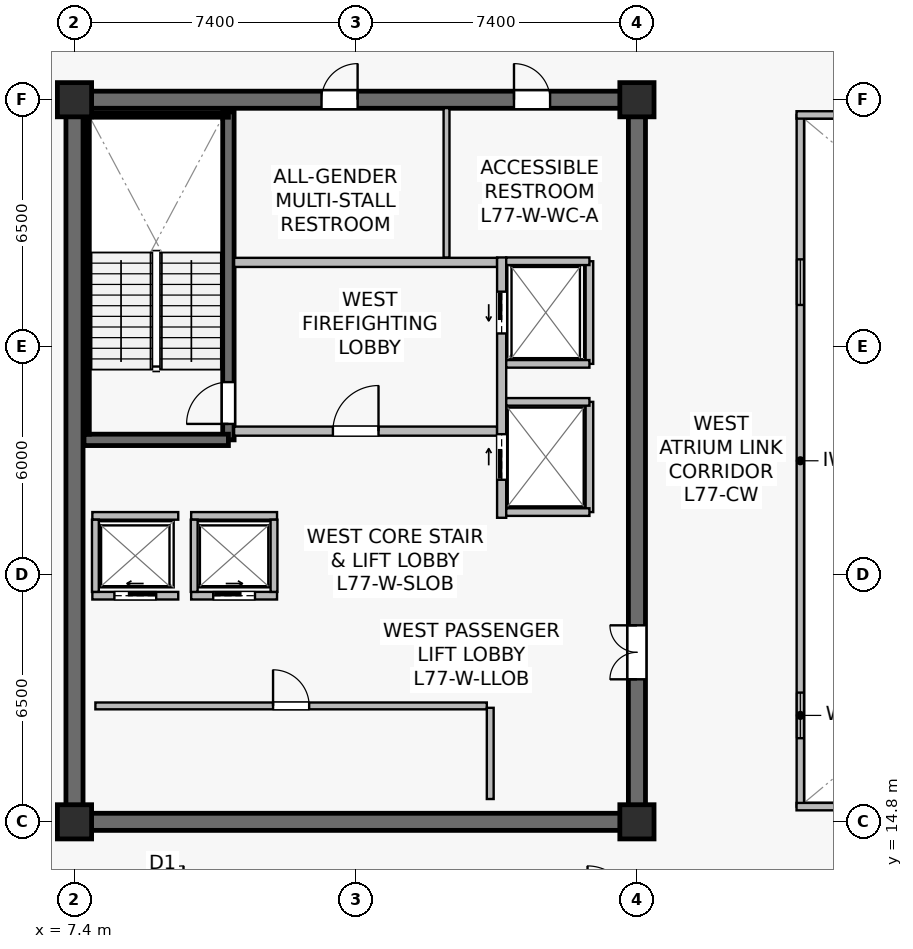
"""IFC4 building model, lengths in metres.
Left out: names, types, materials, properties, quantities, classifications, styles, units other than length and angle.
Written with IfcOpenShell. Run it as: python <this file> out.ifc"""

import sys

from ifc_helpers import new_model, si_unit, direction, frame, frame_2d, origin, origin_2d, place, context, subcontext, project, spatial, rectangle, extrude, source, transform, mapped, element, fill, save


model = new_model("IFC4")
c1 = context("Model", 3, precision=1e-05, world=origin(), true_north=direction((0.0, 1.0)))
c2 = subcontext(c1, "Body", "Model", "MODEL_VIEW")
j1 = project(units=[si_unit("LENGTHUNIT", "METRE"), si_unit("PLANEANGLEUNIT", "RADIAN")], contexts=[c1])
p1 = place(None, origin())
s1 = spatial("IfcSite", under=j1, at=p1, CompositionType="ELEMENT")
p2 = place(p1, origin())
s2 = spatial("IfcBuilding", under=s1, at=p2, CompositionType="ELEMENT")
p3 = place(p2, frame((0.0, 0.0, 322.8)))
s3 = spatial("IfcBuildingStorey", under=s2, at=p3, CompositionType="ELEMENT", Elevation=322.8)
p4 = place(p3, frame((7.175, 14.8, 0.0), z_axis=(0.0, 0.0, 1.0), x_axis=(1.0, 0.0, 0.0)))
e1 = element("IfcWall", 1, at=p4, inside=s3, PredefinedType="SHEAR", context=c2, shape_type="SweptSolid", body=[
    extrude(rectangle(XDim=15.25, YDim=0.45, at=frame_2d((7.625, 0.0))), origin(), (0.0, 0.0, 1.0), 3.92),
])
p5 = place(p3, frame((7.175, 33.8, 0.0), z_axis=(0.0, 0.0, 1.0), x_axis=(1.0, 0.0, 0.0)))
e2 = element("IfcWall", 2, at=p5, inside=s3, PredefinedType="SHEAR", context=c2, shape_type="SweptSolid", body=[
    extrude(rectangle(XDim=15.25, YDim=0.45, at=frame_2d((7.625, 0.0))), origin(), (0.0, 0.0, 1.0), 3.92),
])
p6 = place(p5, frame((6.725, 0.0, 0.0)))
e3 = element("IfcOpeningElement", 3, at=p6, cuts=e2, PredefinedType="OPENING", context=c2, shape_type="SweptSolid", body=[
    extrude(rectangle(XDim=0.95, YDim=2.15, at=frame_2d((0.475, 1.075))), frame((0.0, 0.235, 0.0), z_axis=(0.0, -1.0, 0.0), x_axis=(1.0, 0.0, 0.0)), (0.0, 0.0, 1.0), 0.47),
])
p7 = place(p5, frame((11.79, 0.0, 0.0)))
e4 = element("IfcOpeningElement", 4, at=p7, cuts=e2, PredefinedType="OPENING", context=c2, shape_type="SweptSolid", body=[
    extrude(rectangle(XDim=0.95, YDim=2.15, at=frame_2d((0.475, 1.075))), frame((0.0, 0.235, 0.0), z_axis=(0.0, -1.0, 0.0), x_axis=(1.0, 0.0, 0.0)), (0.0, 0.0, 1.0), 0.47),
])
p8 = place(p3, frame((7.4, 15.025, 0.0), z_axis=(0.0, 0.0, 1.0), x_axis=(0.0, 1.0, 0.0)))
e5 = element("IfcWall", 5, at=p8, inside=s3, PredefinedType="SHEAR", context=c2, shape_type="SweptSolid", body=[
    extrude(rectangle(XDim=18.55, YDim=0.45, at=frame_2d((9.275, 0.0))), origin(), (0.0, 0.0, 1.0), 3.92),
])
p9 = place(p3, frame((22.2, 15.025, 0.0), z_axis=(0.0, 0.0, 1.0), x_axis=(0.0, 1.0, 0.0)))
e6 = element("IfcWall", 6, at=p9, inside=s3, PredefinedType="SHEAR", context=c2, shape_type="SweptSolid", body=[
    extrude(rectangle(XDim=18.55, YDim=0.45, at=frame_2d((9.275, 0.0))), origin(), (0.0, 0.0, 1.0), 3.92),
])
p10 = place(p9, frame((3.525, 0.0, 0.0)))
e7 = element("IfcOpeningElement", 7, at=p10, cuts=e6, PredefinedType="OPENING", context=c2, shape_type="SweptSolid", body=[
    extrude(rectangle(XDim=1.42, YDim=2.2, at=frame_2d((0.71, 1.1))), frame((0.0, 0.235, 0.0), z_axis=(0.0, -1.0, 0.0), x_axis=(1.0, 0.0, 0.0)), (0.0, 0.0, 1.0), 0.47),
])
p11 = place(p3, frame((11.45, 24.85, 0.0), z_axis=(0.0, 0.0, 1.0), x_axis=(0.0, 1.0, 0.0)))
e8 = element("IfcWall", 8, at=p11, inside=s3, PredefinedType="SHEAR", context=c2, shape_type="SweptSolid", body=[
    extrude(rectangle(XDim=8.63, YDim=0.3, at=frame_2d((4.315, 0.0))), origin(), (0.0, 0.0, 1.0), 3.92),
])
p12 = place(p11, frame((0.42, 0.0, 0.0)))
e9 = element("IfcOpeningElement", 9, at=p12, cuts=e8, PredefinedType="OPENING", context=c2, shape_type="SweptSolid", body=[
    extrude(rectangle(XDim=1.1, YDim=2.15, at=frame_2d((0.55, 1.075))), frame((0.0, 0.16, 0.0), z_axis=(0.0, -1.0, 0.0), x_axis=(1.0, 0.0, 0.0)), (0.0, 0.0, 1.0), 0.32),
])
p13 = place(p3, frame((7.65, 24.85, 0.0), z_axis=(0.0, 0.0, 1.0), x_axis=(1.0, 0.0, 0.0)))
e10 = element("IfcWall", 10, at=p13, inside=s3, PredefinedType="SHEAR", context=c2, shape_type="SweptSolid", body=[
    extrude(rectangle(XDim=3.8, YDim=0.3, at=frame_2d((1.9, 0.0))), origin(), (0.0, 0.0, 1.0), 3.92),
])
p14 = place(p3, frame((7.73, 33.4, 0.0), z_axis=(0.0, 0.0, 1.0), x_axis=(1.0, 0.0, 0.0)))
e11 = element("IfcWall", 11, at=p14, inside=s3, PredefinedType="SOLIDWALL", context=c2, shape_type="SweptSolid", body=[
    extrude(rectangle(XDim=3.72, YDim=0.12, at=frame_2d((1.86, 0.0))), origin(), (0.0, 0.0, 1.0), 3.92),
])
p15 = place(p3, frame((7.73, 25.0, 0.0), z_axis=(0.0, 0.0, 1.0), x_axis=(0.0, 1.0, 0.0)))
e12 = element("IfcWall", 12, at=p15, inside=s3, PredefinedType="SOLIDWALL", context=c2, shape_type="SweptSolid", body=[
    extrude(rectangle(XDim=8.32, YDim=0.12, at=frame_2d((4.16, 0.0))), origin(), (0.0, 0.0, 1.0), 3.92),
])
m1 = source(origin(), c2, "Body", "SweptSolid", [
    extrude(rectangle(XDim=0.9, YDim=0.9, at=origin_2d()), origin(), (0.0, 0.0, 1.0), 4.2),
])
for number, where, z_axis, x_axis in (
    (13, (7.4, 14.8, 0.0), (0.0, 0.0, 1.0), (1.0, 0.0, 0.0)),
    (14, (22.2, 14.8, 0.0), (0.0, 0.0, 1.0), (1.0, 0.0, 0.0)),
    (15, (7.4, 33.8, 0.0), (0.0, 0.0, 1.0), (1.0, 0.0, 0.0)),
    (16, (22.2, 33.8, 0.0), (0.0, 0.0, 1.0), (1.0, 0.0, 0.0)),
):
    element("IfcColumn", number, at=place(p3, frame(where, z_axis=z_axis, x_axis=x_axis)), inside=s3, PredefinedType="COLUMN", context=c2, shape_type="MappedRepresentation", body=[
        mapped(m1, transform((0.0, 0.0, 0.0), scale=1.0)),
    ])
p16 = place(p3, frame((11.6, 25.08, 0.0), z_axis=(0.0, 0.0, 1.0), x_axis=(1.0, 0.0, 0.0)))
e17 = element("IfcWall", 17, at=p16, inside=s3, PredefinedType="SOLIDWALL", context=c2, shape_type="SweptSolid", body=[
    extrude(rectangle(XDim=6.92, YDim=0.24, at=frame_2d((3.46, 0.0))), origin(), (0.0, 0.0, 1.0), 3.317),
])
p17 = place(p16, frame((2.6, 0.0, 0.0)))
e18 = element("IfcOpeningElement", 18, at=p17, cuts=e17, PredefinedType="OPENING", context=c2, shape_type="SweptSolid", body=[
    extrude(rectangle(XDim=1.2, YDim=2.16, at=frame_2d((0.6, 1.08))), frame((0.0, 0.13, 0.0), z_axis=(0.0, -1.0, 0.0), x_axis=(1.0, 0.0, 0.0)), (0.0, 0.0, 1.0), 0.26),
])
p18 = place(p3, frame((11.6, 29.52, 0.0), z_axis=(0.0, 0.0, 1.0), x_axis=(1.0, 0.0, 0.0)))
e19 = element("IfcWall", 19, at=p18, inside=s3, PredefinedType="SOLIDWALL", context=c2, shape_type="SweptSolid", body=[
    extrude(rectangle(XDim=6.92, YDim=0.24, at=frame_2d((3.46, 0.0))), origin(), (0.0, 0.0, 1.0), 3.317),
])
p19 = place(p3, frame((18.64, 22.8, 0.0), z_axis=(0.0, 0.0, 1.0), x_axis=(0.0, 1.0, 0.0)))
e20 = element("IfcWall", 20, at=p19, inside=s3, PredefinedType="SOLIDWALL", context=c2, shape_type="SweptSolid", body=[
    extrude(rectangle(XDim=6.85, YDim=0.24, at=frame_2d((3.425, 0.0))), origin(), (0.0, 0.0, 1.0), 3.055),
])
p20 = place(p19, frame((4.85, 0.0, 0.0)))
e21 = element("IfcOpeningElement", 21, at=p20, cuts=e20, PredefinedType="OPENING", context=c2, shape_type="SweptSolid", body=[
    extrude(rectangle(XDim=1.1, YDim=2.22, at=frame_2d((0.55, 1.11))), frame((0.0, 0.13, 0.0), z_axis=(0.0, -1.0, 0.0), x_axis=(1.0, 0.0, 0.0)), (0.0, 0.0, 1.0), 0.26),
])
p21 = place(p19, frame((1.0, 0.0, 0.0)))
e22 = element("IfcOpeningElement", 22, at=p21, cuts=e20, PredefinedType="OPENING", context=c2, shape_type="SweptSolid", body=[
    extrude(rectangle(XDim=1.2, YDim=2.22, at=frame_2d((0.6, 1.11))), frame((0.0, 0.13, 0.0), z_axis=(0.0, -1.0, 0.0), x_axis=(1.0, 0.0, 0.0)), (0.0, 0.0, 1.0), 0.26),
])
p22 = place(p3, frame((7.87, 20.75, 0.0), z_axis=(0.0, 0.0, 1.0), x_axis=(1.0, 0.0, 0.0)))
e23 = element("IfcWall", 23, at=p22, inside=s3, PredefinedType="SOLIDWALL", context=c2, shape_type="SweptSolid", body=[
    extrude(rectangle(XDim=2.26, YDim=0.2, at=frame_2d((1.13, 0.0))), origin(), (0.0, 0.0, 1.0), 3.92),
])
p23 = place(p22, frame((0.58, 0.0, 0.0)))
e24 = element("IfcOpeningElement", 24, at=p23, cuts=e23, PredefinedType="OPENING", context=c2, shape_type="SweptSolid", body=[
    extrude(rectangle(XDim=1.1, YDim=2.22, at=frame_2d((0.55, 1.11))), frame((0.0, 0.11, 0.0), z_axis=(0.0, -1.0, 0.0), x_axis=(1.0, 0.0, 0.0)), (0.0, 0.0, 1.0), 0.22),
])
p24 = place(p3, frame((7.87, 22.85, 0.0), z_axis=(0.0, 0.0, 1.0), x_axis=(1.0, 0.0, 0.0)))
e25 = element("IfcWall", 25, at=p24, inside=s3, PredefinedType="SOLIDWALL", context=c2, shape_type="SweptSolid", body=[
    extrude(rectangle(XDim=2.26, YDim=0.2, at=frame_2d((1.13, 0.0))), origin(), (0.0, 0.0, 1.0), 3.92),
])
p25 = place(p3, frame((7.95, 20.85, 0.0), z_axis=(0.0, 0.0, 1.0), x_axis=(0.0, 1.0, 0.0)))
e26 = element("IfcWall", 26, at=p25, inside=s3, PredefinedType="SOLIDWALL", context=c2, shape_type="SweptSolid", body=[
    extrude(rectangle(XDim=1.9, YDim=0.18, at=frame_2d((0.95, 0.0))), origin(), (0.0, 0.0, 1.0), 3.92),
])
p26 = place(p3, frame((10.47, 20.75, 0.0), z_axis=(0.0, 0.0, 1.0), x_axis=(1.0, 0.0, 0.0)))
e27 = element("IfcWall", 27, at=p26, inside=s3, PredefinedType="SOLIDWALL", context=c2, shape_type="SweptSolid", body=[
    extrude(rectangle(XDim=2.26, YDim=0.2, at=frame_2d((1.13, 0.0))), origin(), (0.0, 0.0, 1.0), 3.92),
])
p27 = place(p26, frame((0.58, 0.0, 0.0)))
e28 = element("IfcOpeningElement", 28, at=p27, cuts=e27, PredefinedType="OPENING", context=c2, shape_type="SweptSolid", body=[
    extrude(rectangle(XDim=1.1, YDim=2.22, at=frame_2d((0.55, 1.11))), frame((0.0, 0.11, 0.0), z_axis=(0.0, -1.0, 0.0), x_axis=(1.0, 0.0, 0.0)), (0.0, 0.0, 1.0), 0.22),
])
p28 = place(p3, frame((10.47, 22.85, 0.0), z_axis=(0.0, 0.0, 1.0), x_axis=(1.0, 0.0, 0.0)))
e29 = element("IfcWall", 29, at=p28, inside=s3, PredefinedType="SOLIDWALL", context=c2, shape_type="SweptSolid", body=[
    extrude(rectangle(XDim=2.26, YDim=0.2, at=frame_2d((1.13, 0.0))), origin(), (0.0, 0.0, 1.0), 3.92),
])
for number, where, z_axis, x_axis in (
    (30, (10.55, 20.85, 0.0), (0.0, 0.0, 1.0), (0.0, 1.0, 0.0)),
    (31, (12.65, 20.85, 0.0), (0.0, 0.0, 1.0), (0.0, 1.0, 0.0)),
):
    element("IfcWall", number, at=place(p3, frame(where, z_axis=z_axis, x_axis=x_axis)), inside=s3, PredefinedType="SOLIDWALL", context=c2, shape_type="SweptSolid", body=[
        extrude(rectangle(XDim=1.9, YDim=0.18, at=frame_2d((0.95, 0.0))), origin(), (0.0, 0.0, 1.0), 3.92),
    ])
p29 = place(p3, frame((20.95, 26.85, 0.0), z_axis=(0.0, 0.0, 1.0), x_axis=(0.0, 1.0, 0.0)))
e32 = element("IfcWall", 32, at=p29, inside=s3, PredefinedType="SOLIDWALL", context=c2, shape_type="SweptSolid", body=[
    extrude(rectangle(XDim=2.7, YDim=0.2, at=frame_2d((1.35, 0.0))), origin(), (0.0, 0.0, 1.0), 3.92),
])
p30 = place(p3, frame((18.76, 29.55, 0.0), z_axis=(0.0, 0.0, 1.0), x_axis=(1.0, 0.0, 0.0)))
e33 = element("IfcWall", 33, at=p30, inside=s3, PredefinedType="SOLIDWALL", context=c2, shape_type="SweptSolid", body=[
    extrude(rectangle(XDim=2.19, YDim=0.2, at=frame_2d((1.095, 0.0))), origin(), (0.0, 0.0, 1.0), 3.92),
])
p31 = place(p3, frame((18.76, 26.85, 0.0), z_axis=(0.0, 0.0, 1.0), x_axis=(1.0, 0.0, 0.0)))
e34 = element("IfcWall", 34, at=p31, inside=s3, PredefinedType="SOLIDWALL", context=c2, shape_type="SweptSolid", body=[
    extrude(rectangle(XDim=2.19, YDim=0.2, at=frame_2d((1.095, 0.0))), origin(), (0.0, 0.0, 1.0), 3.317),
])
p32 = place(p3, frame((20.95, 22.95, 0.0), z_axis=(0.0, 0.0, 1.0), x_axis=(0.0, 1.0, 0.0)))
e35 = element("IfcWall", 35, at=p32, inside=s3, PredefinedType="SOLIDWALL", context=c2, shape_type="SweptSolid", body=[
    extrude(rectangle(XDim=2.9, YDim=0.2, at=frame_2d((1.45, 0.0))), origin(), (0.0, 0.0, 1.0), 3.055),
])
for number, where, z_axis, x_axis in (
    (36, (18.76, 25.85, 0.0), (0.0, 0.0, 1.0), (1.0, 0.0, 0.0)),
    (37, (18.76, 22.95, 0.0), (0.0, 0.0, 1.0), (1.0, 0.0, 0.0)),
):
    element("IfcWall", number, at=place(p3, frame(where, z_axis=z_axis, x_axis=x_axis)), inside=s3, PredefinedType="SOLIDWALL", context=c2, shape_type="SweptSolid", body=[
        extrude(rectangle(XDim=2.19, YDim=0.2, at=frame_2d((1.095, 0.0))), origin(), (0.0, 0.0, 1.0), 3.92),
    ])
p33 = place(p3, frame((7.95, 17.85, 0.0), z_axis=(0.0, 0.0, 1.0), x_axis=(1.0, 0.0, 0.0)))
e38 = element("IfcWall", 38, at=p33, inside=s3, PredefinedType="SOLIDWALL", context=c2, shape_type="SweptSolid", body=[
    extrude(rectangle(XDim=10.3, YDim=0.18, at=frame_2d((5.15, 0.0))), origin(), (0.0, 0.0, 1.0), 3.317),
])
p34 = place(p33, frame((4.675, 0.0, 0.0)))
e39 = element("IfcOpeningElement", 39, at=p34, cuts=e38, PredefinedType="OPENING", context=c2, shape_type="SweptSolid", body=[
    extrude(rectangle(XDim=0.95, YDim=2.15, at=frame_2d((0.475, 1.075))), frame((0.0, 0.1, 0.0), z_axis=(0.0, -1.0, 0.0), x_axis=(1.0, 0.0, 0.0)), (0.0, 0.0, 1.0), 0.2),
])
p35 = place(p3, frame((18.34, 15.4, 0.0), z_axis=(0.0, 0.0, 1.0), x_axis=(0.0, 1.0, 0.0)))
e40 = element("IfcWall", 40, at=p35, inside=s3, PredefinedType="SOLIDWALL", context=c2, shape_type="SweptSolid", body=[
    extrude(rectangle(XDim=2.4, YDim=0.18, at=frame_2d((1.2, 0.0))), origin(), (0.0, 0.0, 1.0), 3.92),
])
p36 = place(p3, frame((17.19, 29.65, 0.0), z_axis=(0.0, 0.0, 1.0), x_axis=(0.0, 1.0, 0.0)))
e41 = element("IfcWall", 41, at=p36, inside=s3, PredefinedType="PLUMBINGWALL", context=c2, shape_type="SweptSolid", body=[
    extrude(rectangle(XDim=3.93, YDim=0.155, at=frame_2d((1.965, 0.0))), origin(), (0.0, 0.0, 1.0), 3.92),
])
p37 = place(p3, frame((26.5, 15.2, 0.0), z_axis=(0.0, 0.0, 1.0), x_axis=(0.0, 1.0, 0.0)))
e42 = element("IfcWall", 42, at=p37, inside=s3, PredefinedType="SOLIDWALL", context=c2, shape_type="SweptSolid", body=[
    extrude(rectangle(XDim=18.2, YDim=0.195, at=frame_2d((9.1, 0.0))), origin(), (0.0, 0.0, 1.0), 3.92),
])
p38 = place(p37, frame((1.8, 0.0, 0.9)))
e43 = element("IfcOpeningElement", 43, at=p38, cuts=e42, PredefinedType="OPENING", context=c2, shape_type="SweptSolid", body=[
    extrude(rectangle(XDim=1.2, YDim=1.35, at=frame_2d((0.6, 0.675))), frame((0.0, 0.107, 0.0), z_axis=(0.0, -1.0, 0.0), x_axis=(1.0, 0.0, 0.0)), (0.0, 0.0, 1.0), 0.215),
])
p39 = place(p37, frame((13.2, 0.0, 0.9)))
e44 = element("IfcOpeningElement", 44, at=p39, cuts=e42, PredefinedType="OPENING", context=c2, shape_type="SweptSolid", body=[
    extrude(rectangle(XDim=1.2, YDim=1.35, at=frame_2d((0.6, 0.675))), frame((0.0, 0.107, 0.0), z_axis=(0.0, -1.0, 0.0), x_axis=(1.0, 0.0, 0.0)), (0.0, 0.0, 1.0), 0.215),
])
for number, where, z_axis, x_axis in (
    (45, (26.4, 15.2, 0.0), (0.0, 0.0, 1.0), (1.0, 0.0, 0.0)),
    (46, (26.4, 33.4, 0.0), (0.0, 0.0, 1.0), (1.0, 0.0, 0.0)),
):
    element("IfcWall", number, at=place(p3, frame(where, z_axis=z_axis, x_axis=x_axis)), inside=s3, PredefinedType="SOLIDWALL", context=c2, shape_type="SweptSolid", body=[
        extrude(rectangle(XDim=22.0, YDim=0.195, at=frame_2d((11.0, 0.0))), origin(), (0.0, 0.0, 1.0), 3.92),
    ])
m2 = source(origin(), c2, "Body", "SweptSolid", [
    extrude(rectangle(XDim=1.2, YDim=1.35, at=frame_2d((0.6, 0.675))), frame((0.0, 0.03, 0.0), z_axis=(0.0, -1.0, 0.0), x_axis=(1.0, 0.0, 0.0)), (0.0, 0.0, 1.0), 0.06),
])
p40 = place(p38, origin())
e47 = element("IfcWindow", 47, at=p40, inside=s3, PartitioningType="SINGLE_PANEL", PredefinedType="WINDOW", context=c2, shape_type="MappedRepresentation", body=[
    mapped(m2, transform((0.0, 0.0, 0.0), scale=1.0)),
])
fill(e43, e47)
p41 = place(p39, origin())
e48 = element("IfcWindow", 48, at=p41, inside=s3, PartitioningType="SINGLE_PANEL", PredefinedType="WINDOW", context=c2, shape_type="MappedRepresentation", body=[
    mapped(m2, transform((0.0, 0.0, 0.0), scale=1.0)),
])
fill(e44, e48)
m3 = source(origin(), c2, "Body", "SweptSolid", [
    extrude(rectangle(XDim=1.1, YDim=2.15, at=frame_2d((0.55, 1.075))), frame((0.0, 0.025, 0.0), z_axis=(0.0, -1.0, 0.0), x_axis=(1.0, 0.0, 0.0)), (0.0, 0.0, 1.0), 0.05),
])
p42 = place(p12, origin())
e49 = element("IfcDoor", 49, at=p42, inside=s3, OperationType="SINGLE_SWING_LEFT", PredefinedType="DOOR", context=c2, shape_type="MappedRepresentation", body=[
    mapped(m3, transform((0.0, 0.0, 0.0), scale=1.0)),
])
fill(e9, e49)
m4 = source(origin(), c2, "Body", "SweptSolid", [
    extrude(rectangle(XDim=1.2, YDim=2.16, at=frame_2d((0.6, 1.08))), frame((0.0, 0.025, 0.0), z_axis=(0.0, -1.0, 0.0), x_axis=(1.0, 0.0, 0.0)), (0.0, 0.0, 1.0), 0.05),
])
p43 = place(p17, origin())
e50 = element("IfcDoor", 50, at=p43, inside=s3, OperationType="SINGLE_SWING_RIGHT", PredefinedType="DOOR", context=c2, shape_type="MappedRepresentation", body=[
    mapped(m4, transform((0.0, 0.0, 0.0), scale=1.0)),
])
fill(e18, e50)
m5 = source(origin(), c2, "Body", "SweptSolid", [
    extrude(rectangle(XDim=1.1, YDim=2.22, at=frame_2d((0.55, 1.11))), frame((0.0, 0.025, 0.0), z_axis=(0.0, -1.0, 0.0), x_axis=(1.0, 0.0, 0.0)), (0.0, 0.0, 1.0), 0.05),
])
p44 = place(p23, origin())
e51 = element("IfcDoor", 51, at=p44, inside=s3, OperationType="SLIDING_TO_LEFT", PredefinedType="USERDEFINED", context=c2, shape_type="MappedRepresentation", body=[
    mapped(m5, transform((0.0, 0.0, 0.0), scale=1.0)),
])
fill(e24, e51)
p45 = place(p27, origin())
e52 = element("IfcDoor", 52, at=p45, inside=s3, OperationType="SLIDING_TO_RIGHT", PredefinedType="USERDEFINED", context=c2, shape_type="MappedRepresentation", body=[
    mapped(m5, transform((0.0, 0.0, 0.0), scale=1.0)),
])
fill(e28, e52)
p46 = place(p20, origin())
e53 = element("IfcDoor", 53, at=p46, inside=s3, OperationType="SLIDING_TO_LEFT", PredefinedType="USERDEFINED", context=c2, shape_type="MappedRepresentation", body=[
    mapped(m5, transform((0.0, 0.0, 0.0), scale=1.0)),
])
fill(e21, e53)
m6 = source(origin(), c2, "Body", "SweptSolid", [
    extrude(rectangle(XDim=1.2, YDim=2.22, at=frame_2d((0.6, 1.11))), frame((0.0, 0.025, 0.0), z_axis=(0.0, -1.0, 0.0), x_axis=(1.0, 0.0, 0.0)), (0.0, 0.0, 1.0), 0.05),
])
p47 = place(p21, origin())
e54 = element("IfcDoor", 54, at=p47, inside=s3, OperationType="SLIDING_TO_RIGHT", PredefinedType="USERDEFINED", context=c2, shape_type="MappedRepresentation", body=[
    mapped(m6, transform((0.0, 0.0, 0.0), scale=1.0)),
])
fill(e22, e54)
m7 = source(origin(), c2, "Body", "SweptSolid", [
    extrude(rectangle(XDim=0.95, YDim=2.15, at=frame_2d((0.475, 1.075))), frame((0.0, 0.025, 0.0), z_axis=(0.0, -1.0, 0.0), x_axis=(1.0, 0.0, 0.0)), (0.0, 0.0, 1.0), 0.05),
])
p48 = place(p34, origin())
e55 = element("IfcDoor", 55, at=p48, inside=s3, OperationType="SINGLE_SWING_LEFT", PredefinedType="DOOR", context=c2, shape_type="MappedRepresentation", body=[
    mapped(m7, transform((0.0, 0.0, 0.0), scale=1.0)),
])
fill(e39, e55)
m8 = source(origin(), c2, "Body", "SweptSolid", [
    extrude(rectangle(XDim=1.42, YDim=2.2, at=frame_2d((0.71, 1.1))), frame((0.0, 0.025, 0.0), z_axis=(0.0, -1.0, 0.0), x_axis=(1.0, 0.0, 0.0)), (0.0, 0.0, 1.0), 0.05),
])
p49 = place(p10, origin())
e56 = element("IfcDoor", 56, at=p49, inside=s3, OperationType="DOUBLE_DOOR_SINGLE_SWING", PredefinedType="DOOR", context=c2, shape_type="MappedRepresentation", body=[
    mapped(m8, transform((0.0, 0.0, 0.0), scale=1.0)),
])
fill(e7, e56)
p50 = place(p6, origin())
e57 = element("IfcDoor", 57, at=p50, inside=s3, OperationType="SINGLE_SWING_RIGHT", PredefinedType="DOOR", context=c2, shape_type="MappedRepresentation", body=[
    mapped(m7, transform((0.0, 0.0, 0.0), scale=1.0)),
])
fill(e3, e57)
p51 = place(p7, origin())
e58 = element("IfcDoor", 58, at=p51, inside=s3, OperationType="SINGLE_SWING_LEFT", PredefinedType="DOOR", context=c2, shape_type="MappedRepresentation", body=[
    mapped(m7, transform((0.0, 0.0, 0.0), scale=1.0)),
])
fill(e4, e58)
save(model, sys.argv[1])
